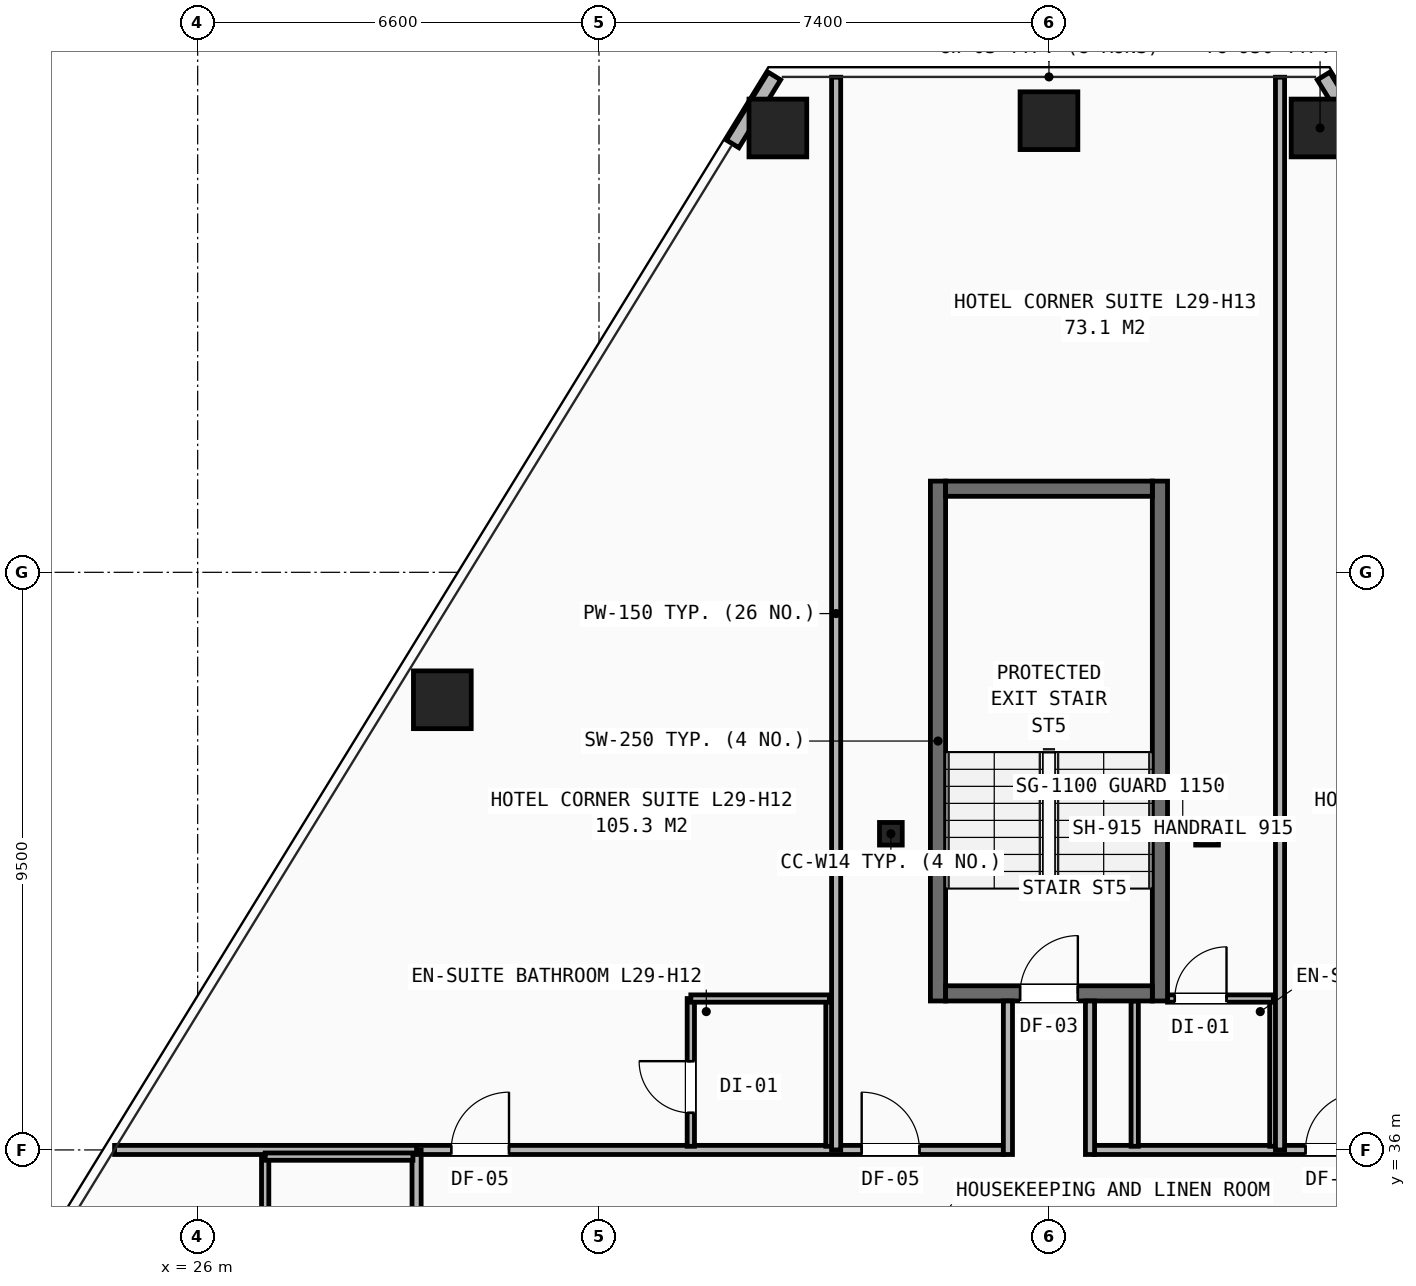
"""IFC4 building model, lengths in metres.
Left out: names, types, materials, properties, quantities, classifications, styles, units other than length and angle.
Written with IfcOpenShell. Run it as: python <this file> out.ifc"""

import sys

from ifc_helpers import new_model, si_unit, direction, frame, frame_2d, origin, origin_2d, place, context, subcontext, project, spatial, rectangle, hollow_rectangle, i_section, extrude, element, fill, save


model = new_model("IFC4")
c1 = context("Model", 3, precision=1e-05, world=origin(), true_north=direction((0.0, 1.0)))
c2 = subcontext(c1, "Body", "Model", "MODEL_VIEW")
j1 = project(units=[si_unit("LENGTHUNIT", "METRE"), si_unit("PLANEANGLEUNIT", "RADIAN")], contexts=[c1])
p1 = place(None, origin())
s1 = spatial("IfcSite", under=j1, at=p1, CompositionType="ELEMENT")
p2 = place(p1, origin())
s2 = spatial("IfcBuilding", under=s1, at=p2, CompositionType="ELEMENT")
p3 = place(p2, frame((0.0, 0.0, 102.2)))
s3 = spatial("IfcBuildingStorey", under=s2, at=p3, CompositionType="ELEMENT", Elevation=102.2)
for number, where, z_axis, x_axis in (
    (1, (37.4, 41.2, 0.0), (0.0, 0.0, 1.0), (1.0, 0.0, 0.0)),
    (2, (42.6, 41.2, 0.0), (0.0, 0.0, 1.0), (1.0, 0.0, 0.0)),
):
    element("IfcColumn", number, at=place(p3, frame(where, z_axis=z_axis, x_axis=x_axis)), inside=s3, PredefinedType="COLUMN", context=c2, shape_type="SweptSolid", body=[
        extrude(i_section(OverallWidth=0.374, OverallDepth=0.372, WebThickness=0.016, FlangeThickness=0.026, at=origin_2d()), origin(), (0.0, 0.0, 1.0), 3.2),
    ])
for number, where, z_axis, x_axis in (
    (3, (44.458, 52.808, 0.0), (0.0, 0.0, 1.0), (1.0, 0.0, 0.0)),
    (4, (40.0, 52.928, 0.0), (0.0, 0.0, 1.0), (1.0, 0.0, 0.0)),
    (5, (35.542, 52.808, 0.0), (0.0, 0.0, 1.0), (1.0, 0.0, 0.0)),
    (6, (30.023, 43.404, 0.0), (0.0, 0.0, 1.0), (1.0, 0.0, 0.0)),
):
    element("IfcColumn", number, at=place(p3, frame(where, z_axis=z_axis, x_axis=x_axis)), inside=s3, PredefinedType="COLUMN", context=c2, shape_type="SweptSolid", body=[
        extrude(hollow_rectangle(XDim=0.95, YDim=0.95, WallThickness=0.065, at=origin_2d()), origin(), (0.0, 0.0, 1.0), 3.2),
    ])
for number, where, z_axis, x_axis in (
    (7, (35.484, 53.663, 0.0), (0.0, 0.0, 1.0), (-0.524, -0.852, 0.0)),
    (8, (45.202, 52.546, 0.0), (0.0, 0.0, 1.0), (-0.524, 0.852, 0.0)),
):
    element("IfcWall", number, at=place(p3, frame(where, z_axis=z_axis, x_axis=x_axis)), inside=s3, PredefinedType="SHEAR", context=c2, shape_type="SweptSolid", body=[
        extrude(rectangle(XDim=1.311, YDim=0.24, at=frame_2d((0.655, 0.0))), origin(), (0.0, 0.0, 1.0), 2.253),
    ])
p4 = place(p3, frame((29.6, 36.0, 0.0), z_axis=(0.0, 0.0, 1.0), x_axis=(1.0, 0.0, 0.0)))
e9 = element("IfcWall", 9, at=p4, inside=s3, PredefinedType="PARTITIONING", context=c2, shape_type="SweptSolid", body=[
    extrude(rectangle(XDim=9.65, YDim=0.15, at=frame_2d((4.825, 0.0))), origin(), (0.0, 0.0, 1.0), 2.503),
])
p5 = place(p4, frame((0.57, 0.0, 0.0)))
e10 = element("IfcOpeningElement", 10, at=p5, cuts=e9, PredefinedType="OPENING", context=c2, shape_type="SweptSolid", body=[
    extrude(rectangle(XDim=0.95, YDim=2.1, at=frame_2d((0.475, 1.05))), frame((0.0, 0.085, 0.0), z_axis=(0.0, -1.0, 0.0), x_axis=(1.0, 0.0, 0.0)), (0.0, 0.0, 1.0), 0.17),
])
p6 = place(p4, frame((7.32, 0.0, 0.0)))
e11 = element("IfcOpeningElement", 11, at=p6, cuts=e9, PredefinedType="OPENING", context=c2, shape_type="SweptSolid", body=[
    extrude(rectangle(XDim=0.95, YDim=2.1, at=frame_2d((0.475, 1.05))), frame((0.0, 0.085, 0.0), z_axis=(0.0, -1.0, 0.0), x_axis=(1.0, 0.0, 0.0)), (0.0, 0.0, 1.0), 0.17),
])
p7 = place(p3, frame((40.75, 36.0, 0.0), z_axis=(0.0, 0.0, 1.0), x_axis=(1.0, 0.0, 0.0)))
e12 = element("IfcWall", 12, at=p7, inside=s3, PredefinedType="PARTITIONING", context=c2, shape_type="SweptSolid", body=[
    extrude(rectangle(XDim=9.65, YDim=0.15, at=frame_2d((4.825, 0.0))), origin(), (0.0, 0.0, 1.0), 2.503),
])
p8 = place(p7, frame((3.47, 0.0, 0.0)))
e13 = element("IfcOpeningElement", 13, at=p8, cuts=e12, PredefinedType="OPENING", context=c2, shape_type="SweptSolid", body=[
    extrude(rectangle(XDim=0.95, YDim=2.1, at=frame_2d((0.475, 1.05))), frame((0.0, 0.085, 0.0), z_axis=(0.0, -1.0, 0.0), x_axis=(1.0, 0.0, 0.0)), (0.0, 0.0, 1.0), 0.17),
])
p9 = place(p3, frame((29.6, 14.1, 0.0), z_axis=(0.0, 0.0, 1.0), x_axis=(0.0, 1.0, 0.0)))
e14 = element("IfcWall", 14, at=p9, inside=s3, PredefinedType="PARTITIONING", context=c2, shape_type="SweptSolid", body=[
    extrude(rectangle(XDim=21.9, YDim=0.15, at=frame_2d((10.95, 0.0))), origin(), (0.0, 0.0, 1.0), 2.421),
])
p10 = place(p9, frame((0.42, 0.0, 0.0)))
e15 = element("IfcOpeningElement", 15, at=p10, cuts=e14, PredefinedType="OPENING", context=c2, shape_type="SweptSolid", body=[
    extrude(rectangle(XDim=0.95, YDim=2.1, at=frame_2d((0.475, 1.05))), frame((0.0, 0.085, 0.0), z_axis=(0.0, -1.0, 0.0), x_axis=(1.0, 0.0, 0.0)), (0.0, 0.0, 1.0), 0.17),
])
p11 = place(p9, frame((5.12, 0.0, 0.0)))
e16 = element("IfcOpeningElement", 16, at=p11, cuts=e14, PredefinedType="OPENING", context=c2, shape_type="SweptSolid", body=[
    extrude(rectangle(XDim=0.95, YDim=2.1, at=frame_2d((0.475, 1.05))), frame((0.0, 0.085, 0.0), z_axis=(0.0, -1.0, 0.0), x_axis=(1.0, 0.0, 0.0)), (0.0, 0.0, 1.0), 0.17),
])
p12 = place(p9, frame((10.32, 0.0, 0.0)))
e17 = element("IfcOpeningElement", 17, at=p12, cuts=e14, PredefinedType="OPENING", context=c2, shape_type="SweptSolid", body=[
    extrude(rectangle(XDim=0.95, YDim=2.1, at=frame_2d((0.475, 1.05))), frame((0.0, 0.085, 0.0), z_axis=(0.0, -1.0, 0.0), x_axis=(1.0, 0.0, 0.0)), (0.0, 0.0, 1.0), 0.17),
])
p13 = place(p9, frame((16.12, 0.0, 0.0)))
e18 = element("IfcOpeningElement", 18, at=p13, cuts=e14, PredefinedType="OPENING", context=c2, shape_type="SweptSolid", body=[
    extrude(rectangle(XDim=0.95, YDim=2.1, at=frame_2d((0.475, 1.05))), frame((0.0, 0.085, 0.0), z_axis=(0.0, -1.0, 0.0), x_axis=(1.0, 0.0, 0.0)), (0.0, 0.0, 1.0), 0.17),
])
p14 = place(p3, frame((24.633, 36.0, 0.0), z_axis=(0.0, 0.0, 1.0), x_axis=(1.0, 0.0, 0.0)))
e19 = element("IfcWall", 19, at=p14, inside=s3, PredefinedType="PARTITIONING", context=c2, shape_type="SweptSolid", body=[
    extrude(rectangle(XDim=4.967, YDim=0.15, at=frame_2d((2.483, 0.0))), origin(), (0.0, 0.0, 1.0), 2.258),
])
p15 = place(p3, frame((27.11, 33.61, 0.0), z_axis=(0.0, 0.0, 1.0), x_axis=(0.0, 1.0, 0.0)))
e20 = element("IfcWall", 20, at=p15, inside=s3, PredefinedType="PARTITIONING", context=c2, shape_type="SweptSolid", body=[
    extrude(rectangle(XDim=2.28, YDim=0.12, at=frame_2d((1.14, 0.0))), origin(), (0.0, 0.0, 1.0), 2.97),
])
p16 = place(p3, frame((27.11, 35.89, 0.0), z_axis=(0.0, 0.0, 1.0), x_axis=(1.0, 0.0, 0.0)))
e21 = element("IfcWall", 21, at=p16, inside=s3, PredefinedType="PARTITIONING", context=c2, shape_type="SweptSolid", body=[
    extrude(rectangle(XDim=2.43, YDim=0.12, at=frame_2d((1.215, 0.0))), origin(), (0.0, 0.0, 1.0), 2.503),
])
p17 = place(p3, frame((34.11, 36.06, 0.0), z_axis=(0.0, 0.0, 1.0), x_axis=(0.0, 1.0, 0.0)))
e22 = element("IfcWall", 22, at=p17, inside=s3, PredefinedType="PARTITIONING", context=c2, shape_type="SweptSolid", body=[
    extrude(rectangle(XDim=2.43, YDim=0.12, at=frame_2d((1.215, 0.0))), origin(), (0.0, 0.0, 1.0), 2.97),
])
p18 = place(p17, frame((0.55, 0.0, 0.0)))
e23 = element("IfcOpeningElement", 23, at=p18, cuts=e22, PredefinedType="OPENING", context=c2, shape_type="SweptSolid", body=[
    extrude(rectangle(XDim=0.85, YDim=2.05, at=frame_2d((0.425, 1.025))), frame((0.0, 0.07, 0.0), z_axis=(0.0, -1.0, 0.0), x_axis=(1.0, 0.0, 0.0)), (0.0, 0.0, 1.0), 0.14),
])
p19 = place(p3, frame((36.39, 36.06, 0.0), z_axis=(0.0, 0.0, 1.0), x_axis=(0.0, 1.0, 0.0)))
e24 = element("IfcWall", 24, at=p19, inside=s3, PredefinedType="PARTITIONING", context=c2, shape_type="SweptSolid", body=[
    extrude(rectangle(XDim=2.43, YDim=0.12, at=frame_2d((1.215, 0.0))), origin(), (0.0, 0.0, 1.0), 2.97),
])
p20 = place(p3, frame((34.11, 38.49, 0.0), z_axis=(0.0, 0.0, 1.0), x_axis=(1.0, 0.0, 0.0)))
e25 = element("IfcWall", 25, at=p20, inside=s3, PredefinedType="PARTITIONING", context=c2, shape_type="SweptSolid", body=[
    extrude(rectangle(XDim=2.28, YDim=0.12, at=frame_2d((1.14, 0.0))), origin(), (0.0, 0.0, 1.0), 2.97),
])
p21 = place(p3, frame((36.5, 36.0, 0.0), z_axis=(0.0, 0.0, 1.0), x_axis=(0.0, 1.0, 0.0)))
e26 = element("IfcWall", 26, at=p21, inside=s3, PredefinedType="PARTITIONING", context=c2, shape_type="SweptSolid", body=[
    extrude(rectangle(XDim=17.643, YDim=0.15, at=frame_2d((8.821, 0.0))), origin(), (0.0, 0.0, 1.0), 2.258),
])
p22 = place(p3, frame((41.41, 36.06, 0.0), z_axis=(0.0, 0.0, 1.0), x_axis=(0.0, 1.0, 0.0)))
e27 = element("IfcWall", 27, at=p22, inside=s3, PredefinedType="PARTITIONING", context=c2, shape_type="SweptSolid", body=[
    extrude(rectangle(XDim=2.39, YDim=0.12, at=frame_2d((1.195, 0.0))), origin(), (0.0, 0.0, 1.0), 2.97),
])
p23 = place(p3, frame((43.69, 36.06, 0.0), z_axis=(0.0, 0.0, 1.0), x_axis=(0.0, 1.0, 0.0)))
e28 = element("IfcWall", 28, at=p23, inside=s3, PredefinedType="PARTITIONING", context=c2, shape_type="SweptSolid", body=[
    extrude(rectangle(XDim=2.43, YDim=0.12, at=frame_2d((1.215, 0.0))), origin(), (0.0, 0.0, 1.0), 2.97),
])
p24 = place(p3, frame((41.95, 38.49, 0.0), z_axis=(0.0, 0.0, 1.0), x_axis=(1.0, 0.0, 0.0)))
e29 = element("IfcWall", 29, at=p24, inside=s3, PredefinedType="PARTITIONING", context=c2, shape_type="SweptSolid", body=[
    extrude(rectangle(XDim=1.74, YDim=0.12, at=frame_2d((0.87, 0.0))), origin(), (0.0, 0.0, 1.0), 2.97),
])
p25 = place(p24, frame((0.12, 0.0, 0.0)))
e30 = element("IfcOpeningElement", 30, at=p25, cuts=e29, PredefinedType="OPENING", context=c2, shape_type="SweptSolid", body=[
    extrude(rectangle(XDim=0.85, YDim=2.05, at=frame_2d((0.425, 1.025))), frame((0.0, 0.07, 0.0), z_axis=(0.0, -1.0, 0.0), x_axis=(1.0, 0.0, 0.0)), (0.0, 0.0, 1.0), 0.14),
])
p26 = place(p3, frame((43.8, 36.0, 0.0), z_axis=(0.0, 0.0, 1.0), x_axis=(0.0, 1.0, 0.0)))
e31 = element("IfcWall", 31, at=p26, inside=s3, PredefinedType="PARTITIONING", context=c2, shape_type="SweptSolid", body=[
    extrude(rectangle(XDim=17.643, YDim=0.15, at=frame_2d((8.821, 0.0))), origin(), (0.0, 0.0, 1.0), 2.258),
])
for number, where, z_axis, x_axis in (
    (32, (38.175, 38.45, 0.0), (0.0, 0.0, 1.0), (0.0, 1.0, 0.0)),
    (33, (41.825, 38.45, 0.0), (0.0, 0.0, 1.0), (0.0, 1.0, 0.0)),
):
    element("IfcWall", number, at=place(p3, frame(where, z_axis=z_axis, x_axis=x_axis)), inside=s3, PredefinedType="SHEAR", context=c2, shape_type="SweptSolid", body=[
        extrude(rectangle(XDim=8.55, YDim=0.25, at=frame_2d((4.275, 0.0))), origin(), (0.0, 0.0, 1.0), 2.97),
    ])
p27 = place(p3, frame((38.3, 38.575, 0.0), z_axis=(0.0, 0.0, 1.0), x_axis=(1.0, 0.0, 0.0)))
e34 = element("IfcWall", 34, at=p27, inside=s3, PredefinedType="SHEAR", context=c2, shape_type="SweptSolid", body=[
    extrude(rectangle(XDim=3.4, YDim=0.25, at=frame_2d((1.7, 0.0))), origin(), (0.0, 0.0, 1.0), 2.97),
])
p28 = place(p27, frame((1.225, 0.0, 0.0)))
e35 = element("IfcOpeningElement", 35, at=p28, cuts=e34, PredefinedType="OPENING", context=c2, shape_type="SweptSolid", body=[
    extrude(rectangle(XDim=0.95, YDim=2.1, at=frame_2d((0.475, 1.05))), frame((0.0, 0.135, 0.0), z_axis=(0.0, -1.0, 0.0), x_axis=(1.0, 0.0, 0.0)), (0.0, 0.0, 1.0), 0.27),
])
p29 = place(p3, frame((38.3, 46.875, 0.0), z_axis=(0.0, 0.0, 1.0), x_axis=(1.0, 0.0, 0.0)))
e36 = element("IfcWall", 36, at=p29, inside=s3, PredefinedType="SHEAR", context=c2, shape_type="SweptSolid", body=[
    extrude(rectangle(XDim=3.4, YDim=0.25, at=frame_2d((1.7, 0.0))), origin(), (0.0, 0.0, 1.0), 2.97),
])
for number, where, z_axis, x_axis in (
    (37, (39.325, 35.925, 0.0), (0.0, 0.0, 1.0), (0.0, 1.0, 0.0)),
    (38, (40.675, 35.925, 0.0), (0.0, 0.0, 1.0), (0.0, 1.0, 0.0)),
):
    element("IfcWall", number, at=place(p3, frame(where, z_axis=z_axis, x_axis=x_axis)), inside=s3, PredefinedType="PARTITIONING", context=c2, shape_type="SweptSolid", body=[
        extrude(rectangle(XDim=2.525, YDim=0.15, at=frame_2d((1.262, 0.0))), origin(), (0.0, 0.0, 1.0), 2.97),
    ])
p30 = place(p5, origin())
e39 = element("IfcDoor", 39, at=p30, inside=s3, OperationType="SINGLE_SWING_RIGHT", PredefinedType="DOOR", context=c2, shape_type="SweptSolid", body=[
    extrude(rectangle(XDim=0.95, YDim=2.1, at=frame_2d((0.475, 1.05))), frame((0.0, 0.025, 0.0), z_axis=(0.0, -1.0, 0.0), x_axis=(1.0, 0.0, 0.0)), (0.0, 0.0, 1.0), 0.05),
])
fill(e10, e39)
p31 = place(p18, origin())
e40 = element("IfcDoor", 40, at=p31, inside=s3, OperationType="SINGLE_SWING_RIGHT", PredefinedType="DOOR", context=c2, shape_type="SweptSolid", body=[
    extrude(rectangle(XDim=0.85, YDim=2.05, at=frame_2d((0.425, 1.025))), frame((0.0, 0.025, 0.0), z_axis=(0.0, -1.0, 0.0), x_axis=(1.0, 0.0, 0.0)), (0.0, 0.0, 1.0), 0.05),
])
fill(e23, e40)
p32 = place(p6, origin())
e41 = element("IfcDoor", 41, at=p32, inside=s3, OperationType="SINGLE_SWING_LEFT", PredefinedType="DOOR", context=c2, shape_type="SweptSolid", body=[
    extrude(rectangle(XDim=0.95, YDim=2.1, at=frame_2d((0.475, 1.05))), frame((0.0, 0.025, 0.0), z_axis=(0.0, -1.0, 0.0), x_axis=(1.0, 0.0, 0.0)), (0.0, 0.0, 1.0), 0.05),
])
fill(e11, e41)
p33 = place(p25, origin())
e42 = element("IfcDoor", 42, at=p33, inside=s3, OperationType="SINGLE_SWING_RIGHT", PredefinedType="DOOR", context=c2, shape_type="SweptSolid", body=[
    extrude(rectangle(XDim=0.85, YDim=2.05, at=frame_2d((0.425, 1.025))), frame((0.0, 0.025, 0.0), z_axis=(0.0, -1.0, 0.0), x_axis=(1.0, 0.0, 0.0)), (0.0, 0.0, 1.0), 0.05),
])
fill(e30, e42)
p34 = place(p8, origin())
e43 = element("IfcDoor", 43, at=p34, inside=s3, OperationType="SINGLE_SWING_RIGHT", PredefinedType="DOOR", context=c2, shape_type="SweptSolid", body=[
    extrude(rectangle(XDim=0.95, YDim=2.1, at=frame_2d((0.475, 1.05))), frame((0.0, 0.025, 0.0), z_axis=(0.0, -1.0, 0.0), x_axis=(1.0, 0.0, 0.0)), (0.0, 0.0, 1.0), 0.05),
])
fill(e13, e43)
p35 = place(p28, origin())
e44 = element("IfcDoor", 44, at=p35, inside=s3, OperationType="SINGLE_SWING_RIGHT", PredefinedType="DOOR", context=c2, shape_type="SweptSolid", body=[
    extrude(rectangle(XDim=0.95, YDim=2.1, at=frame_2d((0.475, 1.05))), frame((0.0, 0.025, 0.0), z_axis=(0.0, -1.0, 0.0), x_axis=(1.0, 0.0, 0.0)), (0.0, 0.0, 1.0), 0.05),
])
fill(e35, e44)
save(model, sys.argv[1])
